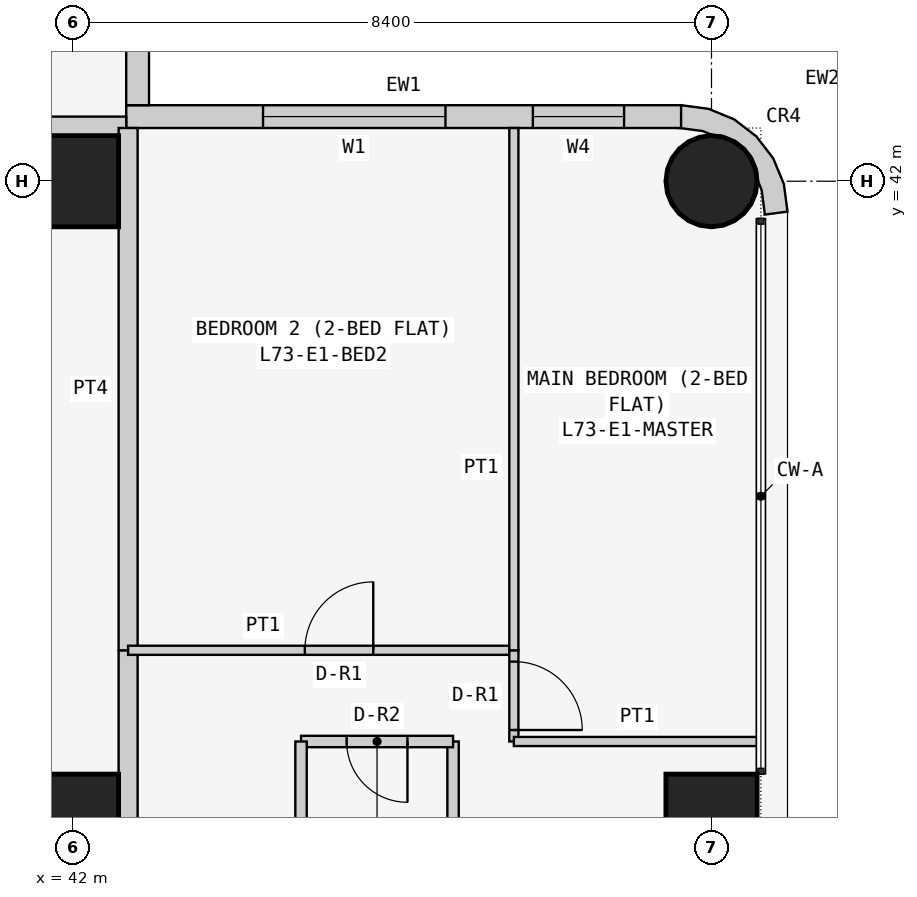
"""IFC4 building model, lengths in metres.
Left out: names, types, materials, properties, quantities, classifications, styles, units other than length and angle.
Written with IfcOpenShell. Run it as: python <this file> out.ifc"""

import sys

from ifc_helpers import new_model, si_unit, direction, frame, frame_2d, origin, origin_2d, place, context, subcontext, project, spatial, polyline, rectangle, circle, outline, extrude, element, fill, save


model = new_model("IFC4")
c1 = context("Model", 3, precision=1e-05, world=origin(), true_north=direction((0.0, 1.0)))
c2 = subcontext(c1, "Body", "Model", "MODEL_VIEW")
j1 = project(units=[si_unit("LENGTHUNIT", "METRE"), si_unit("PLANEANGLEUNIT", "RADIAN")], contexts=[c1])
p1 = place(None, origin())
s1 = spatial("IfcSite", under=j1, at=p1, CompositionType="ELEMENT")
p2 = place(p1, origin())
s2 = spatial("IfcBuilding", under=s1, at=p2, CompositionType="ELEMENT")
p3 = place(p2, frame((0.0, 0.0, 279.3)))
s3 = spatial("IfcBuildingStorey", under=s2, at=p3, CompositionType="ELEMENT", Elevation=279.3)
for number, where, z_axis, x_axis in (
    (1, (42.0, 33.6, 0.0), (0.0, 0.0, 1.0), (1.0, 0.0, 0.0)),
    (2, (42.0, 42.0, 0.0), (0.0, 0.0, 1.0), (1.0, 0.0, 0.0)),
    (3, (50.4, 33.6, 0.0), (0.0, 0.0, 1.0), (1.0, 0.0, 0.0)),
):
    element("IfcColumn", number, at=place(p3, frame(where, z_axis=z_axis, x_axis=x_axis)), inside=s3, PredefinedType="COLUMN", context=c2, shape_type="SweptSolid", body=[
        extrude(rectangle(XDim=1.2, YDim=1.2, at=origin_2d()), origin(), (0.0, 0.0, 1.0), 3.6),
    ])
p4 = place(p3, frame((50.4, 42.0, 0.0), z_axis=(0.0, 0.0, 1.0), x_axis=(1.0, 0.0, 0.0)))
e4 = element("IfcColumn", 4, at=p4, inside=s3, PredefinedType="COLUMN", context=c2, shape_type="SweptSolid", body=[
    extrude(circle(Radius=0.6, at=origin_2d()), origin(), (0.0, 0.0, 1.0), 3.6),
])
p5 = place(p3, frame((50.0, 42.85, 0.0), z_axis=(0.0, 0.0, 1.0), x_axis=(-1.0, 0.0, 0.0)))
e5 = element("IfcWall", 5, at=p5, inside=s3, PredefinedType="SOLIDWALL", context=c2, shape_type="SweptSolid", body=[
    extrude(rectangle(XDim=7.3, YDim=0.3, at=frame_2d((3.65, 0.0))), origin(), (0.0, 0.0, 1.0), 3.45),
])
p6 = place(p5, frame((3.1, 0.0, 0.9)))
e6 = element("IfcOpeningElement", 6, at=p6, cuts=e5, PredefinedType="OPENING", context=c2, shape_type="SweptSolid", body=[
    extrude(rectangle(XDim=2.4, YDim=1.5, at=frame_2d((1.2, 0.75))), frame((0.0, 0.16, 0.0), z_axis=(0.0, -1.0, 0.0), x_axis=(1.0, 0.0, 0.0)), (0.0, 0.0, 1.0), 0.32),
])
p7 = place(p5, frame((0.75, 0.0, 0.9)))
e7 = element("IfcOpeningElement", 7, at=p7, cuts=e5, PredefinedType="OPENING", context=c2, shape_type="SweptSolid", body=[
    extrude(rectangle(XDim=1.2, YDim=1.5, at=frame_2d((0.6, 0.75))), frame((0.0, 0.16, 0.0), z_axis=(0.0, -1.0, 0.0), x_axis=(1.0, 0.0, 0.0)), (0.0, 0.0, 1.0), 0.32),
])
p8 = place(p3, frame((42.85, 43.0, 0.0), z_axis=(0.0, 0.0, 1.0), x_axis=(0.0, 1.0, 0.0)))
e8 = element("IfcWall", 8, at=p8, inside=s3, PredefinedType="SOLIDWALL", context=c2, shape_type="SweptSolid", body=[
    extrude(rectangle(XDim=7.0, YDim=0.3, at=frame_2d((3.5, 0.0))), origin(), (0.0, 0.0, 1.0), 3.45),
])
p9 = place(p8, frame((1.5, 0.0, 0.9)))
e9 = element("IfcOpeningElement", 9, at=p9, cuts=e8, PredefinedType="OPENING", context=c2, shape_type="SweptSolid", body=[
    extrude(rectangle(XDim=2.4, YDim=1.5, at=frame_2d((1.2, 0.75))), frame((0.0, 0.16, 0.0), z_axis=(0.0, -1.0, 0.0), x_axis=(1.0, 0.0, 0.0)), (0.0, 0.0, 1.0), 0.32),
])
p10 = place(p8, frame((5.05, 0.0, 0.9)))
e10 = element("IfcOpeningElement", 10, at=p10, cuts=e8, PredefinedType="OPENING", context=c2, shape_type="SweptSolid", body=[
    extrude(rectangle(XDim=1.2, YDim=1.5, at=frame_2d((0.6, 0.75))), frame((0.0, 0.16, 0.0), z_axis=(0.0, -1.0, 0.0), x_axis=(1.0, 0.0, 0.0)), (0.0, 0.0, 1.0), 0.32),
])
p11 = place(p3, frame((50.976, 41.638, 0.0), z_axis=(0.0, 0.0, 1.0), x_axis=(0.707106781187, 0.707106781187, 0.0)))
e11 = element("IfcWall", 11, at=p11, inside=s3, PredefinedType="SOLIDWALL", context=c2, shape_type="SweptSolid", body=[
    extrude(outline(polyline([(0.233, 0.114), (0.047, -0.129), (0.033, -0.143), (0.273, -0.327), (0.495, -0.037), (0.635, 0.301), (0.683, 0.663), (0.635, 1.025), (0.495, 1.363), (0.273, 1.653), (0.033, 1.469), (0.047, 1.455), (0.233, 1.212), (0.292, 1.069), (0.358, 1.003), (0.449, 0.782), (0.449, 0.543), (0.358, 0.322), (0.292, 0.257), (0.233, 0.114)])), origin(), (0.0, 0.0, 1.0), 3.45),
])
p12 = place(p3, frame((35.829, 42.725, 0.0), z_axis=(0.0, 0.0, 1.0), x_axis=(1.0, 0.0, 0.0)))
e12 = element("IfcWall", 12, at=p12, inside=s3, PredefinedType="PARTITIONING", context=c2, shape_type="SweptSolid", body=[
    extrude(rectangle(XDim=6.871, YDim=0.25, at=frame_2d((3.436, 0.0))), origin(), (0.0, 0.0, 1.0), 3.45),
])
p13 = place(p3, frame((42.725, 35.829, 0.0), z_axis=(0.0, 0.0, 1.0), x_axis=(0.0, -1.0, 0.0)))
e13 = element("IfcWall", 13, at=p13, inside=s3, PredefinedType="PARTITIONING", context=c2, shape_type="SweptSolid", body=[
    extrude(rectangle(XDim=6.429, YDim=0.25, at=frame_2d((3.215, 0.0))), origin(), (0.0, 0.0, 1.0), 3.45),
])
p14 = place(p13, frame((4.929, 0.0, 0.0)))
e14 = element("IfcOpeningElement", 14, at=p14, cuts=e13, PredefinedType="OPENING", context=c2, shape_type="SweptSolid", body=[
    extrude(rectangle(XDim=1.0, YDim=2.1, at=frame_2d((0.5, 1.05))), frame((0.0, 0.135, 0.0), z_axis=(0.0, -1.0, 0.0), x_axis=(1.0, 0.0, 0.0)), (0.0, 0.0, 1.0), 0.27),
])
p15 = place(p3, frame((42.725, 42.7, 0.0), z_axis=(0.0, 0.0, 1.0), x_axis=(0.0, -1.0, 0.0)))
e15 = element("IfcWall", 15, at=p15, inside=s3, PredefinedType="PARTITIONING", context=c2, shape_type="SweptSolid", body=[
    extrude(rectangle(XDim=6.871, YDim=0.25, at=frame_2d((3.436, 0.0))), origin(), (0.0, 0.0, 1.0), 3.45),
])
p16 = place(p3, frame((47.0, 29.4, 0.0), z_axis=(0.0, 0.0, 1.0), x_axis=(0.0, 1.0, 0.0)))
e16 = element("IfcWall", 16, at=p16, inside=s3, PredefinedType="PARTITIONING", context=c2, shape_type="SweptSolid", body=[
    extrude(rectangle(XDim=5.229, YDim=0.15, at=frame_2d((2.615, 0.0))), origin(), (0.0, 0.0, 1.0), 3.45),
])
p17 = place(p3, frame((47.0, 34.629, 0.0), z_axis=(0.0, 0.0, 1.0), x_axis=(-1.0, 0.0, 0.0)))
e17 = element("IfcWall", 17, at=p17, inside=s3, PredefinedType="PARTITIONING", context=c2, shape_type="SweptSolid", body=[
    extrude(rectangle(XDim=2.0, YDim=0.15, at=frame_2d((1.0, 0.0))), origin(), (0.0, 0.0, 1.0), 3.45),
])
p18 = place(p17, frame((0.6, 0.0, 0.0)))
e18 = element("IfcOpeningElement", 18, at=p18, cuts=e17, PredefinedType="OPENING", context=c2, shape_type="SweptSolid", body=[
    extrude(rectangle(XDim=0.8, YDim=2.1, at=frame_2d((0.4, 1.05))), frame((0.0, 0.085, 0.0), z_axis=(0.0, -1.0, 0.0), x_axis=(1.0, 0.0, 0.0)), (0.0, 0.0, 1.0), 0.17),
])
p19 = place(p3, frame((45.0, 34.629, 0.0), z_axis=(0.0, 0.0, 1.0), x_axis=(0.0, -1.0, 0.0)))
e19 = element("IfcWall", 19, at=p19, inside=s3, PredefinedType="PARTITIONING", context=c2, shape_type="SweptSolid", body=[
    extrude(rectangle(XDim=5.229, YDim=0.15, at=frame_2d((2.615, 0.0))), origin(), (0.0, 0.0, 1.0), 3.45),
])
p20 = place(p3, frame((42.725, 35.829, 0.0), z_axis=(0.0, 0.0, 1.0), x_axis=(1.0, 0.0, 0.0)))
e20 = element("IfcWall", 20, at=p20, inside=s3, PredefinedType="PARTITIONING", context=c2, shape_type="SweptSolid", body=[
    extrude(rectangle(XDim=5.075, YDim=0.12, at=frame_2d((2.538, 0.0))), origin(), (0.0, 0.0, 1.0), 3.45),
])
p21 = place(p20, frame((2.325, 0.0, 0.0)))
e21 = element("IfcOpeningElement", 21, at=p21, cuts=e20, PredefinedType="OPENING", context=c2, shape_type="SweptSolid", body=[
    extrude(rectangle(XDim=0.9, YDim=2.1, at=frame_2d((0.45, 1.05))), frame((0.0, 0.07, 0.0), z_axis=(0.0, -1.0, 0.0), x_axis=(1.0, 0.0, 0.0)), (0.0, 0.0, 1.0), 0.14),
])
p22 = place(p3, frame((47.8, 35.829, 0.0), z_axis=(0.0, 0.0, 1.0), x_axis=(0.0, -1.0, 0.0)))
e22 = element("IfcWall", 22, at=p22, inside=s3, PredefinedType="PARTITIONING", context=c2, shape_type="SweptSolid", body=[
    extrude(rectangle(XDim=1.2, YDim=0.12, at=frame_2d((0.6, 0.0))), origin(), (0.0, 0.0, 1.0), 3.45),
])
p23 = place(p22, frame((0.149, 0.0, 0.0)))
e23 = element("IfcOpeningElement", 23, at=p23, cuts=e22, PredefinedType="OPENING", context=c2, shape_type="SweptSolid", body=[
    extrude(rectangle(XDim=0.9, YDim=2.1, at=frame_2d((0.45, 1.05))), frame((0.0, 0.07, 0.0), z_axis=(0.0, -1.0, 0.0), x_axis=(1.0, 0.0, 0.0)), (0.0, 0.0, 1.0), 0.14),
])
p24 = place(p3, frame((47.8, 34.629, 0.0), z_axis=(0.0, 0.0, 1.0), x_axis=(1.0, 0.0, 0.0)))
e24 = element("IfcWall", 24, at=p24, inside=s3, PredefinedType="PARTITIONING", context=c2, shape_type="SweptSolid", body=[
    extrude(rectangle(XDim=3.25, YDim=0.12, at=frame_2d((1.625, 0.0))), origin(), (0.0, 0.0, 1.0), 3.45),
])
p25 = place(p3, frame((47.8, 35.829, 0.0), z_axis=(0.0, 0.0, 1.0), x_axis=(0.0, 1.0, 0.0)))
e25 = element("IfcWall", 25, at=p25, inside=s3, PredefinedType="PARTITIONING", context=c2, shape_type="SweptSolid", body=[
    extrude(rectangle(XDim=6.871, YDim=0.12, at=frame_2d((3.436, 0.0))), origin(), (0.0, 0.0, 1.0), 3.45),
])
p26 = place(p6, origin())
e26 = element("IfcWindow", 26, at=p26, inside=s3, PartitioningType="SINGLE_PANEL", PredefinedType="WINDOW", context=c2, shape_type="SweptSolid", body=[
    extrude(rectangle(XDim=2.4, YDim=1.5, at=frame_2d((1.2, 0.75))), frame((0.0, 0.03, 0.0), z_axis=(0.0, -1.0, 0.0), x_axis=(1.0, 0.0, 0.0)), (0.0, 0.0, 1.0), 0.06),
])
fill(e6, e26)
p27 = place(p7, origin())
e27 = element("IfcWindow", 27, at=p27, inside=s3, PartitioningType="SINGLE_PANEL", PredefinedType="WINDOW", context=c2, shape_type="SweptSolid", body=[
    extrude(rectangle(XDim=1.2, YDim=1.5, at=frame_2d((0.6, 0.75))), frame((0.0, 0.03, 0.0), z_axis=(0.0, -1.0, 0.0), x_axis=(1.0, 0.0, 0.0)), (0.0, 0.0, 1.0), 0.06),
])
fill(e7, e27)
p28 = place(p18, origin())
e28 = element("IfcDoor", 28, at=p28, inside=s3, OperationType="SINGLE_SWING_LEFT", PredefinedType="DOOR", context=c2, shape_type="SweptSolid", body=[
    extrude(rectangle(XDim=0.8, YDim=2.1, at=frame_2d((0.4, 1.05))), frame((0.0, 0.025, 0.0), z_axis=(0.0, -1.0, 0.0), x_axis=(1.0, 0.0, 0.0)), (0.0, 0.0, 1.0), 0.05),
])
fill(e18, e28)
p29 = place(p21, origin())
e29 = element("IfcDoor", 29, at=p29, inside=s3, OperationType="SINGLE_SWING_RIGHT", PredefinedType="DOOR", context=c2, shape_type="SweptSolid", body=[
    extrude(rectangle(XDim=0.9, YDim=2.1, at=frame_2d((0.45, 1.05))), frame((0.0, 0.025, 0.0), z_axis=(0.0, -1.0, 0.0), x_axis=(1.0, 0.0, 0.0)), (0.0, 0.0, 1.0), 0.05),
])
fill(e21, e29)
p30 = place(p23, origin())
e30 = element("IfcDoor", 30, at=p30, inside=s3, OperationType="SINGLE_SWING_RIGHT", PredefinedType="DOOR", context=c2, shape_type="SweptSolid", body=[
    extrude(rectangle(XDim=0.9, YDim=2.1, at=frame_2d((0.45, 1.05))), frame((0.0, 0.025, 0.0), z_axis=(0.0, -1.0, 0.0), x_axis=(1.0, 0.0, 0.0)), (0.0, 0.0, 1.0), 0.05),
])
fill(e23, e30)
save(model, sys.argv[1])
